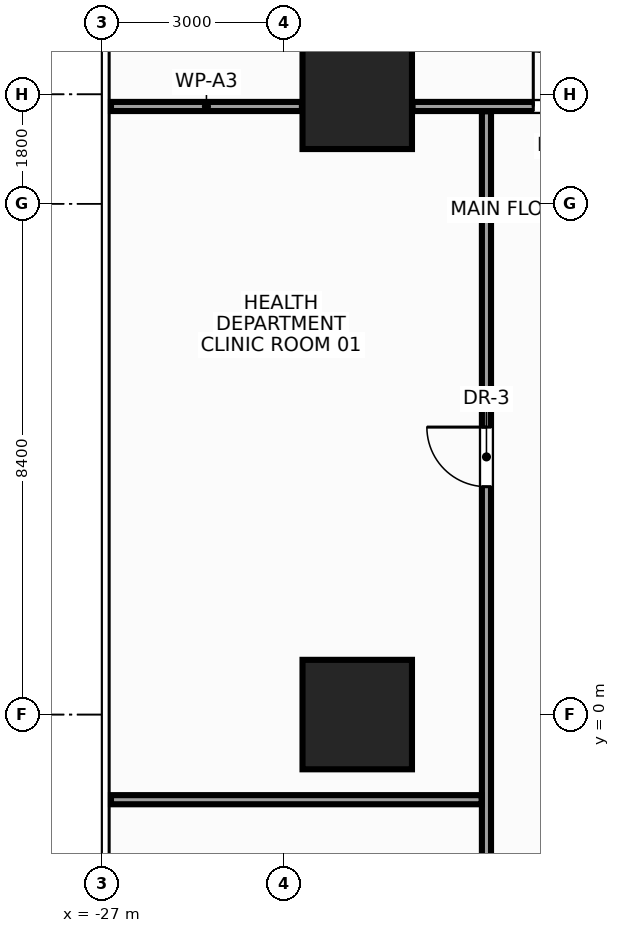
"""IFC4 building model, lengths in metres.
Left out: names, types, materials, properties, quantities, classifications, styles, units other than length and angle.
Written with IfcOpenShell. Run it as: python <this file> out.ifc"""

import sys

from ifc_helpers import new_model, si_unit, direction, frame, frame_2d, origin, origin_2d, place, context, subcontext, project, spatial, rectangle, extrude, source, transform, mapped, element, fill, save


model = new_model("IFC4")
c1 = context("Model", 3, precision=1e-05, world=origin(), true_north=direction((0.0, 1.0)))
c2 = subcontext(c1, "Body", "Model", "MODEL_VIEW")
j1 = project(units=[si_unit("LENGTHUNIT", "METRE"), si_unit("PLANEANGLEUNIT", "RADIAN")], contexts=[c1])
p1 = place(None, origin())
s1 = spatial("IfcSite", under=j1, at=p1, CompositionType="ELEMENT")
p2 = place(p1, origin())
s2 = spatial("IfcBuilding", under=s1, at=p2, CompositionType="ELEMENT")
p3 = place(p2, frame((0.0, 0.0, 45.2)))
s3 = spatial("IfcBuildingStorey", under=s2, at=p3, CompositionType="ELEMENT", Elevation=45.2)
m1 = source(origin(), c2, "Body", "SweptSolid", [
    extrude(rectangle(XDim=1.8, YDim=1.8, at=origin_2d()), origin(), (0.0, 0.0, 1.0), 3.6),
])
for number, where, z_axis, x_axis in (
    (1, (-22.8, 0.0, 0.0), (0.0, 0.0, 1.0), (1.0, 0.0, 0.0)),
    (2, (-22.8, 10.2, 0.0), (0.0, 0.0, 1.0), (1.0, 0.0, 0.0)),
):
    element("IfcColumn", number, at=place(p3, frame(where, z_axis=z_axis, x_axis=x_axis)), inside=s3, PredefinedType="COLUMN", context=c2, shape_type="MappedRepresentation", body=[
        mapped(m1, transform((0.0, 0.0, 0.0), x_axis=(1.0, 0.0, 0.0), y_axis=(0.0, 1.0, 0.0), z_axis=(0.0, 0.0, 1.0), scale=1.0)),
    ])
m2 = source(origin(), c2, "Body", "SweptSolid", [
    extrude(rectangle(XDim=3.14, YDim=0.15, at=frame_2d((1.57, 0.0))), origin(), (0.0, 0.0, 1.0), 2.435),
])
p4 = place(p3, frame((-26.85, 10.0, 0.0), z_axis=(0.0, 0.0, 1.0), x_axis=(1.0, 0.0, 0.0)))
e3 = element("IfcWall", 3, at=p4, inside=s3, PredefinedType="PARTITIONING", context=c2, shape_type="MappedRepresentation", body=[
    mapped(m2, transform((0.0, 0.0, 0.0), x_axis=(1.0, 0.0, 0.0), y_axis=(0.0, 1.0, 0.0), z_axis=(0.0, 0.0, 1.0), scale=1.0)),
])
m3 = source(origin(), c2, "Body", "SweptSolid", [
    extrude(rectangle(XDim=4.18, YDim=0.15, at=frame_2d((2.09, 0.0))), origin(), (0.0, 0.0, 1.0), 2.745),
])
p5 = place(p3, frame((-21.89, 10.0, 0.0), z_axis=(0.0, 0.0, 1.0), x_axis=(1.0, 0.0, 0.0)))
e4 = element("IfcWall", 4, at=p5, inside=s3, PredefinedType="PARTITIONING", context=c2, shape_type="MappedRepresentation", body=[
    mapped(m3, transform((0.0, 0.0, 0.0), x_axis=(1.0, 0.0, 0.0), y_axis=(0.0, 1.0, 0.0), z_axis=(0.0, 0.0, 1.0), scale=1.0)),
])
p6 = place(p5, frame((1.985, 0.0, 0.0)))
e5 = element("IfcOpeningElement", 5, at=p6, cuts=e4, PredefinedType="OPENING", context=c2, shape_type="SweptSolid", body=[
    extrude(rectangle(XDim=0.9, YDim=2.15, at=frame_2d((0.45, 1.075))), frame((0.0, 0.087, 0.0), z_axis=(0.0, -1.0, 0.0), x_axis=(1.0, 0.0, 0.0)), (0.0, 0.0, 1.0), 0.174),
])
m4 = source(origin(), c2, "Body", "SweptSolid", [
    extrude(rectangle(XDim=24.115, YDim=0.15, at=frame_2d((12.058, 0.0))), origin(), (0.0, 0.0, 1.0), 2.745),
])
p7 = place(p3, frame((-20.675, -14.195, 0.0), z_axis=(0.0, 0.0, 1.0), x_axis=(0.0, 1.0, 0.0)))
e6 = element("IfcWall", 6, at=p7, inside=s3, PredefinedType="PARTITIONING", context=c2, shape_type="MappedRepresentation", body=[
    mapped(m4, transform((0.0, 0.0, 0.0), x_axis=(1.0, 0.0, 0.0), y_axis=(0.0, 1.0, 0.0), z_axis=(0.0, 0.0, 1.0), scale=1.0)),
])
p8 = place(p7, frame((17.942, 0.0, 0.0)))
e7 = element("IfcOpeningElement", 7, at=p8, cuts=e6, PredefinedType="OPENING", context=c2, shape_type="SweptSolid", body=[
    extrude(rectangle(XDim=0.98, YDim=2.15, at=frame_2d((0.49, 1.075))), frame((0.0, 0.087, 0.0), z_axis=(0.0, -1.0, 0.0), x_axis=(1.0, 0.0, 0.0)), (0.0, 0.0, 1.0), 0.174),
])
m5 = source(origin(), c2, "Body", "SweptSolid", [
    extrude(rectangle(XDim=6.095, YDim=0.15, at=frame_2d((3.048, 0.0))), origin(), (0.0, 0.0, 1.0), 2.745),
])
p9 = place(p3, frame((-26.85, -1.4, 0.0), z_axis=(0.0, 0.0, 1.0), x_axis=(1.0, 0.0, 0.0)))
e8 = element("IfcWall", 8, at=p9, inside=s3, PredefinedType="PARTITIONING", context=c2, shape_type="MappedRepresentation", body=[
    mapped(m5, transform((0.0, 0.0, 0.0), x_axis=(1.0, 0.0, 0.0), y_axis=(0.0, 1.0, 0.0), z_axis=(0.0, 0.0, 1.0), scale=1.0)),
])
m6 = source(origin(), c2, "Body", "SweptSolid", [
    extrude(rectangle(XDim=0.9, YDim=2.15, at=frame_2d((0.45, 1.075))), frame((0.0, 0.025, 0.0), z_axis=(0.0, -1.0, 0.0), x_axis=(1.0, 0.0, 0.0)), (0.0, 0.0, 1.0), 0.05),
])
p10 = place(p6, origin())
e9 = element("IfcDoor", 9, at=p10, inside=s3, OperationType="SINGLE_SWING_LEFT", PredefinedType="DOOR", context=c2, shape_type="MappedRepresentation", body=[
    mapped(m6, transform((0.0, 0.0, 0.0), x_axis=(1.0, 0.0, 0.0), y_axis=(0.0, 1.0, 0.0), z_axis=(0.0, 0.0, 1.0), scale=1.0)),
])
fill(e5, e9)
m7 = source(origin(), c2, "Body", "SweptSolid", [
    extrude(rectangle(XDim=0.98, YDim=2.15, at=frame_2d((0.49, 1.075))), frame((0.0, 0.025, 0.0), z_axis=(0.0, -1.0, 0.0), x_axis=(1.0, 0.0, 0.0)), (0.0, 0.0, 1.0), 0.05),
])
p11 = place(p8, origin())
e10 = element("IfcDoor", 10, at=p11, inside=s3, OperationType="SINGLE_SWING_RIGHT", PredefinedType="DOOR", context=c2, shape_type="MappedRepresentation", body=[
    mapped(m7, transform((0.0, 0.0, 0.0), x_axis=(1.0, 0.0, 0.0), y_axis=(0.0, 1.0, 0.0), z_axis=(0.0, 0.0, 1.0), scale=1.0)),
])
fill(e7, e10)
save(model, sys.argv[1])
